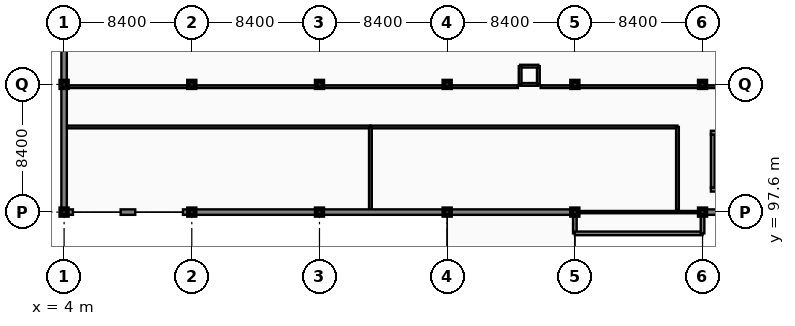
"""IFC4 building model, lengths in metres.
Left out: names, types, materials, properties, quantities, classifications, styles, units other than length and angle.
Written with IfcOpenShell. Run it as: python <this file> out.ifc"""

import sys

from ifc_helpers import new_model, si_unit, direction, frame, frame_2d, origin, origin_2d, place, context, subcontext, project, spatial, rectangle, extrude, element, fill, save


model = new_model("IFC4")
c1 = context("Model", 3, precision=1e-05, world=origin(), true_north=direction((0.0, 1.0)))
c2 = subcontext(c1, "Body", "Model", "MODEL_VIEW")
j1 = project(units=[si_unit("LENGTHUNIT", "METRE"), si_unit("PLANEANGLEUNIT", "RADIAN")], contexts=[c1])
p1 = place(None, origin())
s1 = spatial("IfcSite", under=j1, at=p1, CompositionType="ELEMENT")
p2 = place(p1, origin())
s2 = spatial("IfcBuilding", under=s1, at=p2, CompositionType="ELEMENT")
p3 = place(p2, frame((0.0, 0.0, 5.4)))
s3 = spatial("IfcBuildingStorey", under=s2, at=p3, CompositionType="ELEMENT", Elevation=5.4)
for number, where, z_axis, x_axis in (
    (1, (4.0, 97.6, 0.0), (0.0, 0.0, 1.0), (1.0, 0.0, 0.0)),
    (2, (4.0, 106.0, 0.0), (0.0, 0.0, 1.0), (1.0, 0.0, 0.0)),
    (3, (12.4, 97.6, 0.0), (0.0, 0.0, 1.0), (1.0, 0.0, 0.0)),
    (4, (12.4, 106.0, 0.0), (0.0, 0.0, 1.0), (1.0, 0.0, 0.0)),
    (5, (20.8, 97.6, 0.0), (0.0, 0.0, 1.0), (1.0, 0.0, 0.0)),
    (6, (20.8, 106.0, 0.0), (0.0, 0.0, 1.0), (1.0, 0.0, 0.0)),
    (7, (29.2, 97.6, 0.0), (0.0, 0.0, 1.0), (1.0, 0.0, 0.0)),
    (8, (29.2, 106.0, 0.0), (0.0, 0.0, 1.0), (1.0, 0.0, 0.0)),
    (9, (37.6, 97.6, 0.0), (0.0, 0.0, 1.0), (1.0, 0.0, 0.0)),
    (10, (37.6, 106.0, 0.0), (0.0, 0.0, 1.0), (1.0, 0.0, 0.0)),
    (11, (46.0, 97.6, 0.0), (0.0, 0.0, 1.0), (1.0, 0.0, 0.0)),
    (12, (46.0, 106.0, 0.0), (0.0, 0.0, 1.0), (1.0, 0.0, 0.0)),
):
    element("IfcColumn", number, at=place(p3, frame(where, z_axis=z_axis, x_axis=x_axis)), inside=s3, PredefinedType="COLUMN", context=c2, shape_type="SweptSolid", body=[
        extrude(rectangle(XDim=0.44, YDim=0.44, at=origin_2d()), origin(), (0.0, 0.0, 1.0), 4.2),
    ])
p4 = place(p3, frame((4.14, 103.2, 0.0), z_axis=(0.0, 0.0, 1.0), x_axis=(1.0, 0.0, 0.0)))
e13 = element("IfcWall", 13, at=p4, inside=s3, PredefinedType="PARTITIONING", context=c2, shape_type="SweptSolid", body=[
    extrude(rectangle(XDim=20.01, YDim=0.18, at=frame_2d((10.005, 0.0))), origin(), (0.0, 0.0, 1.0), 3.37),
])
p5 = place(p4, frame((9.505, 0.0, -0.01)))
e14 = element("IfcOpeningElement", 14, at=p5, cuts=e13, PredefinedType="OPENING", context=c2, shape_type="SweptSolid", body=[
    extrude(rectangle(XDim=1.0, YDim=2.16, at=frame_2d((0.5, 1.08))), frame((0.0, 0.1, 0.0), z_axis=(0.0, -1.0, 0.0), x_axis=(1.0, 0.0, 0.0)), (0.0, 0.0, 1.0), 0.2),
])
p6 = place(p3, frame((24.15, 103.2, 0.0), z_axis=(0.0, 0.0, 1.0), x_axis=(1.0, 0.0, 0.0)))
e15 = element("IfcWall", 15, at=p6, inside=s3, PredefinedType="PARTITIONING", context=c2, shape_type="SweptSolid", body=[
    extrude(rectangle(XDim=20.2, YDim=0.18, at=frame_2d((10.1, 0.0))), origin(), (0.0, 0.0, 1.0), 3.37),
])
p7 = place(p6, frame((9.6, 0.0, -0.01)))
e16 = element("IfcOpeningElement", 16, at=p7, cuts=e15, PredefinedType="OPENING", context=c2, shape_type="SweptSolid", body=[
    extrude(rectangle(XDim=1.0, YDim=2.16, at=frame_2d((0.5, 1.08))), frame((0.0, 0.1, 0.0), z_axis=(0.0, -1.0, 0.0), x_axis=(1.0, 0.0, 0.0)), (0.0, 0.0, 1.0), 0.2),
])
for number, where, z_axis, x_axis in (
    (17, (24.15, 97.74, 0.0), (0.0, 0.0, 1.0), (0.0, 1.0, 0.0)),
    (18, (44.35, 97.74, 0.0), (0.0, 0.0, 1.0), (0.0, 1.0, 0.0)),
):
    element("IfcWall", number, at=place(p3, frame(where, z_axis=z_axis, x_axis=x_axis)), inside=s3, PredefinedType="PARTITIONING", context=c2, shape_type="SweptSolid", body=[
        extrude(rectangle(XDim=5.46, YDim=0.18, at=frame_2d((2.73, 0.0))), origin(), (0.0, 0.0, 1.0), 3.52),
    ])
p8 = place(p3, frame((37.6, 97.6, 0.0), z_axis=(0.0, 0.0, 1.0), x_axis=(1.0, 0.0, 0.0)))
e19 = element("IfcWall", 19, at=p8, inside=s3, PredefinedType="PARTITIONING", context=c2, shape_type="SweptSolid", body=[
    extrude(rectangle(XDim=8.4, YDim=0.15, at=frame_2d((4.2, 0.0))), origin(), (0.0, 0.0, 1.0), 3.15),
])
p9 = place(p8, frame((2.59, 0.0, -0.01)))
e20 = element("IfcOpeningElement", 20, at=p9, cuts=e19, PredefinedType="OPENING", context=c2, shape_type="SweptSolid", body=[
    extrude(rectangle(XDim=1.0, YDim=2.16, at=frame_2d((0.5, 1.08))), frame((0.0, 0.085, 0.0), z_axis=(0.0, -1.0, 0.0), x_axis=(1.0, 0.0, 0.0)), (0.0, 0.0, 1.0), 0.17),
])
p10 = place(p3, frame((4.14, 105.85, 0.0), z_axis=(0.0, 0.0, 1.0), x_axis=(1.0, 0.0, 0.0)))
e21 = element("IfcWall", 21, at=p10, inside=s3, PredefinedType="PARTITIONING", context=c2, shape_type="SweptSolid", body=[
    extrude(rectangle(XDim=29.71, YDim=0.18, at=frame_2d((14.855, 0.0))), origin(), (0.0, 0.0, 1.0), 3.25),
])
p11 = place(p10, frame((12.649, 0.0, -0.01)))
e22 = element("IfcOpeningElement", 22, at=p11, cuts=e21, PredefinedType="OPENING", context=c2, shape_type="SweptSolid", body=[
    extrude(rectangle(XDim=1.6, YDim=2.21, at=frame_2d((0.8, 1.105))), frame((0.0, 0.1, 0.0), z_axis=(0.0, -1.0, 0.0), x_axis=(1.0, 0.0, 0.0)), (0.0, 0.0, 1.0), 0.2),
])
p12 = place(p3, frame((35.35, 105.85, 0.0), z_axis=(0.0, 0.0, 1.0), x_axis=(1.0, 0.0, 0.0)))
e23 = element("IfcWall", 23, at=p12, inside=s3, PredefinedType="PARTITIONING", context=c2, shape_type="SweptSolid", body=[
    extrude(rectangle(XDim=17.7, YDim=0.18, at=frame_2d((8.85, 0.0))), origin(), (0.0, 0.0, 1.0), 3.25),
])
p13 = place(p3, frame((7.72, 97.6, 0.0), z_axis=(0.0, 0.0, 1.0), x_axis=(1.0, 0.0, 0.0)))
e24 = element("IfcWall", 24, at=p13, inside=s3, PredefinedType="SOLIDWALL", context=c2, shape_type="SweptSolid", body=[
    extrude(rectangle(XDim=0.96, YDim=0.36, at=frame_2d((0.48, 0.0))), origin(), (0.0, 0.0, 1.0), 3.31),
])
p14 = place(p3, frame((4.13, 97.6, 0.0), z_axis=(0.0, 0.0, 1.0), x_axis=(1.0, 0.0, 0.0)))
e25 = element("IfcWall", 25, at=p14, inside=s3, PredefinedType="SOLIDWALL", context=c2, shape_type="SweptSolid", body=[
    extrude(rectangle(XDim=0.45, YDim=0.36, at=frame_2d((0.225, 0.0))), origin(), (0.0, 0.0, 1.0), 3.31),
])
p15 = place(p3, frame((11.82, 97.6, 0.0), z_axis=(0.0, 0.0, 1.0), x_axis=(1.0, 0.0, 0.0)))
e26 = element("IfcWall", 26, at=p15, inside=s3, PredefinedType="SOLIDWALL", context=c2, shape_type="SweptSolid", body=[
    extrude(rectangle(XDim=0.45, YDim=0.36, at=frame_2d((0.225, 0.0))), origin(), (0.0, 0.0, 1.0), 3.31),
])
p16 = place(p3, frame((12.4, 97.6, 0.0), z_axis=(0.0, 0.0, 1.0), x_axis=(1.0, 0.0, 0.0)))
e27 = element("IfcWall", 27, at=p16, inside=s3, PredefinedType="SOLIDWALL", context=c2, shape_type="SweptSolid", body=[
    extrude(rectangle(XDim=8.4, YDim=0.36, at=frame_2d((4.2, 0.0))), origin(), (0.0, 0.0, 1.0), 3.31),
])
p17 = place(p16, frame((0.46, 0.0, 0.75)))
e28 = element("IfcOpeningElement", 28, at=p17, cuts=e27, PredefinedType="OPENING", context=c2, shape_type="SweptSolid", body=[
    extrude(rectangle(XDim=1.55, YDim=2.42, at=frame_2d((0.775, 1.21))), frame((0.0, 0.19, 0.0), z_axis=(0.0, -1.0, 0.0), x_axis=(1.0, 0.0, 0.0)), (0.0, 0.0, 1.0), 0.38),
])
p18 = place(p16, frame((6.26, 0.0, 0.75)))
e29 = element("IfcOpeningElement", 29, at=p18, cuts=e27, PredefinedType="OPENING", context=c2, shape_type="SweptSolid", body=[
    extrude(rectangle(XDim=1.55, YDim=2.42, at=frame_2d((0.775, 1.21))), frame((0.0, 0.19, 0.0), z_axis=(0.0, -1.0, 0.0), x_axis=(1.0, 0.0, 0.0)), (0.0, 0.0, 1.0), 0.38),
])
p19 = place(p3, frame((20.8, 97.6, 0.0), z_axis=(0.0, 0.0, 1.0), x_axis=(1.0, 0.0, 0.0)))
e30 = element("IfcWall", 30, at=p19, inside=s3, PredefinedType="SOLIDWALL", context=c2, shape_type="SweptSolid", body=[
    extrude(rectangle(XDim=8.4, YDim=0.36, at=frame_2d((4.2, 0.0))), origin(), (0.0, 0.0, 1.0), 3.15),
])
p20 = place(p19, frame((0.46, 0.0, 0.75)))
e31 = element("IfcOpeningElement", 31, at=p20, cuts=e30, PredefinedType="OPENING", context=c2, shape_type="SweptSolid", body=[
    extrude(rectangle(XDim=1.55, YDim=2.26, at=frame_2d((0.775, 1.13))), frame((0.0, 0.19, 0.0), z_axis=(0.0, -1.0, 0.0), x_axis=(1.0, 0.0, 0.0)), (0.0, 0.0, 1.0), 0.38),
])
p21 = place(p19, frame((6.26, 0.0, 0.75)))
e32 = element("IfcOpeningElement", 32, at=p21, cuts=e30, PredefinedType="OPENING", context=c2, shape_type="SweptSolid", body=[
    extrude(rectangle(XDim=1.55, YDim=2.26, at=frame_2d((0.775, 1.13))), frame((0.0, 0.19, 0.0), z_axis=(0.0, -1.0, 0.0), x_axis=(1.0, 0.0, 0.0)), (0.0, 0.0, 1.0), 0.38),
])
p22 = place(p3, frame((29.2, 97.6, 0.0), z_axis=(0.0, 0.0, 1.0), x_axis=(1.0, 0.0, 0.0)))
e33 = element("IfcWall", 33, at=p22, inside=s3, PredefinedType="SOLIDWALL", context=c2, shape_type="SweptSolid", body=[
    extrude(rectangle(XDim=8.4, YDim=0.36, at=frame_2d((4.2, 0.0))), origin(), (0.0, 0.0, 1.0), 3.15),
])
p23 = place(p22, frame((3.6, 0.0, -0.01)))
e34 = element("IfcOpeningElement", 34, at=p23, cuts=e33, PredefinedType="OPENING", context=c2, shape_type="SweptSolid", body=[
    extrude(rectangle(XDim=1.2, YDim=2.21, at=frame_2d((0.6, 1.105))), frame((0.0, 0.19, 0.0), z_axis=(0.0, -1.0, 0.0), x_axis=(1.0, 0.0, 0.0)), (0.0, 0.0, 1.0), 0.38),
])
p24 = place(p3, frame((46.0, 97.6, 0.0), z_axis=(0.0, 0.0, 1.0), x_axis=(1.0, 0.0, 0.0)))
e35 = element("IfcWall", 35, at=p24, inside=s3, PredefinedType="SOLIDWALL", context=c2, shape_type="SweptSolid", body=[
    extrude(rectangle(XDim=4.8, YDim=0.36, at=frame_2d((2.4, 0.0))), origin(), (0.0, 0.0, 1.0), 3.37),
])
p25 = place(p24, frame((0.46, 0.0, 0.75)))
e36 = element("IfcOpeningElement", 36, at=p25, cuts=e35, PredefinedType="OPENING", context=c2, shape_type="SweptSolid", body=[
    extrude(rectangle(XDim=1.55, YDim=2.45, at=frame_2d((0.775, 1.225))), frame((0.0, 0.19, 0.0), z_axis=(0.0, -1.0, 0.0), x_axis=(1.0, 0.0, 0.0)), (0.0, 0.0, 1.0), 0.38),
])
p26 = place(p24, frame((2.66, 0.0, 0.75)))
e37 = element("IfcOpeningElement", 37, at=p26, cuts=e35, PredefinedType="OPENING", context=c2, shape_type="SweptSolid", body=[
    extrude(rectangle(XDim=1.55, YDim=2.45, at=frame_2d((0.775, 1.225))), frame((0.0, 0.19, 0.0), z_axis=(0.0, -1.0, 0.0), x_axis=(1.0, 0.0, 0.0)), (0.0, 0.0, 1.0), 0.38),
])
p27 = place(p3, frame((4.0, 106.0, 0.0), z_axis=(0.0, 0.0, 1.0), x_axis=(0.0, -1.0, 0.0)))
e38 = element("IfcWall", 38, at=p27, inside=s3, PredefinedType="SOLIDWALL", context=c2, shape_type="SweptSolid", body=[
    extrude(rectangle(XDim=8.4, YDim=0.36, at=frame_2d((4.2, 0.0))), origin(), (0.0, 0.0, 1.0), 3.31),
])
p28 = place(p27, frame((0.46, 0.0, 0.75)))
e39 = element("IfcOpeningElement", 39, at=p28, cuts=e38, PredefinedType="OPENING", context=c2, shape_type="SweptSolid", body=[
    extrude(rectangle(XDim=1.55, YDim=2.42, at=frame_2d((0.775, 1.21))), frame((0.0, 0.19, 0.0), z_axis=(0.0, -1.0, 0.0), x_axis=(1.0, 0.0, 0.0)), (0.0, 0.0, 1.0), 0.38),
])
p29 = place(p27, frame((6.26, 0.0, 0.75)))
e40 = element("IfcOpeningElement", 40, at=p29, cuts=e38, PredefinedType="OPENING", context=c2, shape_type="SweptSolid", body=[
    extrude(rectangle(XDim=1.55, YDim=2.42, at=frame_2d((0.775, 1.21))), frame((0.0, 0.19, 0.0), z_axis=(0.0, -1.0, 0.0), x_axis=(1.0, 0.0, 0.0)), (0.0, 0.0, 1.0), 0.38),
])
p30 = place(p3, frame((4.0, 115.0, 0.0), z_axis=(0.0, 0.0, 1.0), x_axis=(0.0, -1.0, 0.0)))
e41 = element("IfcWall", 41, at=p30, inside=s3, PredefinedType="SOLIDWALL", context=c2, shape_type="SweptSolid", body=[
    extrude(rectangle(XDim=9.0, YDim=0.36, at=frame_2d((4.5, 0.0))), origin(), (0.0, 0.0, 1.0), 3.31),
])
p31 = place(p30, frame((0.46, 0.0, 0.75)))
e42 = element("IfcOpeningElement", 42, at=p31, cuts=e41, PredefinedType="OPENING", context=c2, shape_type="SweptSolid", body=[
    extrude(rectangle(XDim=1.55, YDim=2.42, at=frame_2d((0.775, 1.21))), frame((0.0, 0.19, 0.0), z_axis=(0.0, -1.0, 0.0), x_axis=(1.0, 0.0, 0.0)), (0.0, 0.0, 1.0), 0.38),
])
p32 = place(p30, frame((6.86, 0.0, 0.75)))
e43 = element("IfcOpeningElement", 43, at=p32, cuts=e41, PredefinedType="OPENING", context=c2, shape_type="SweptSolid", body=[
    extrude(rectangle(XDim=1.55, YDim=2.42, at=frame_2d((0.775, 1.21))), frame((0.0, 0.19, 0.0), z_axis=(0.0, -1.0, 0.0), x_axis=(1.0, 0.0, 0.0)), (0.0, 0.0, 1.0), 0.38),
])
p33 = place(p3, frame((37.6, 97.45, 0.0), z_axis=(0.0, 0.0, 1.0), x_axis=(0.0, -1.0, 0.0)))
e44 = element("IfcWall", 44, at=p33, inside=s3, PredefinedType="SOLIDWALL", context=c2, shape_type="SweptSolid", body=[
    extrude(rectangle(XDim=1.25, YDim=0.24, at=frame_2d((0.625, 0.0))), origin(), (0.0, 0.0, 1.0), 3.15),
])
p34 = place(p3, frame((37.6, 96.2, 0.0), z_axis=(0.0, 0.0, 1.0), x_axis=(1.0, 0.0, 0.0)))
e45 = element("IfcWall", 45, at=p34, inside=s3, PredefinedType="SOLIDWALL", context=c2, shape_type="SweptSolid", body=[
    extrude(rectangle(XDim=8.4, YDim=0.24, at=frame_2d((4.2, 0.0))), origin(), (0.0, 0.0, 1.0), 3.15),
])
p35 = place(p34, frame((0.46, 0.0, 0.65)))
e46 = element("IfcOpeningElement", 46, at=p35, cuts=e45, PredefinedType="OPENING", context=c2, shape_type="SweptSolid", body=[
    extrude(rectangle(XDim=2.4, YDim=2.25, at=frame_2d((1.2, 1.125))), frame((0.0, 0.13, 0.0), z_axis=(0.0, -1.0, 0.0), x_axis=(1.0, 0.0, 0.0)), (0.0, 0.0, 1.0), 0.26),
])
p36 = place(p34, frame((5.46, 0.0, 0.65)))
e47 = element("IfcOpeningElement", 47, at=p36, cuts=e45, PredefinedType="OPENING", context=c2, shape_type="SweptSolid", body=[
    extrude(rectangle(XDim=2.4, YDim=2.25, at=frame_2d((1.2, 1.125))), frame((0.0, 0.13, 0.0), z_axis=(0.0, -1.0, 0.0), x_axis=(1.0, 0.0, 0.0)), (0.0, 0.0, 1.0), 0.26),
])
p37 = place(p3, frame((46.0, 96.2, 0.0), z_axis=(0.0, 0.0, 1.0), x_axis=(0.0, 1.0, 0.0)))
e48 = element("IfcWall", 48, at=p37, inside=s3, PredefinedType="SOLIDWALL", context=c2, shape_type="SweptSolid", body=[
    extrude(rectangle(XDim=1.25, YDim=0.24, at=frame_2d((0.625, 0.0))), origin(), (0.0, 0.0, 1.0), 3.15),
])
p38 = place(p3, frame((46.675, 102.7, 0.0), z_axis=(0.0, 0.0, 1.0), x_axis=(0.0, -1.0, 0.0)))
e49 = element("IfcWall", 49, at=p38, inside=s3, PredefinedType="SHEAR", context=c2, shape_type="SweptSolid", body=[
    extrude(rectangle(XDim=3.5, YDim=0.25, at=frame_2d((1.75, 0.0))), origin(), (0.0, 0.0, 1.0), 4.2),
])
p39 = place(p38, frame((1.1, 0.0, -0.01)))
e50 = element("IfcOpeningElement", 50, at=p39, cuts=e49, PredefinedType="OPENING", context=c2, shape_type="SweptSolid", body=[
    extrude(rectangle(XDim=1.3, YDim=2.16, at=frame_2d((0.65, 1.08))), frame((0.0, 0.135, 0.0), z_axis=(0.0, -1.0, 0.0), x_axis=(1.0, 0.0, 0.0)), (0.0, 0.0, 1.0), 0.27),
])
for number, where, z_axis, x_axis in (
    (51, (46.55, 99.075, 0.0), (0.0, 0.0, 1.0), (1.0, 0.0, 0.0)),
    (52, (46.55, 102.825, 0.0), (0.0, 0.0, 1.0), (1.0, 0.0, 0.0)),
):
    element("IfcWall", number, at=place(p3, frame(where, z_axis=z_axis, x_axis=x_axis)), inside=s3, PredefinedType="SHEAR", context=c2, shape_type="SweptSolid", body=[
        extrude(rectangle(XDim=8.9, YDim=0.25, at=frame_2d((4.45, 0.0))), origin(), (0.0, 0.0, 1.0), 4.2),
    ])
p40 = place(p3, frame((34.0, 106.0, 0.0), z_axis=(0.0, 0.0, 1.0), x_axis=(1.0, 0.0, 0.0)))
e53 = element("IfcWall", 53, at=p40, inside=s3, PredefinedType="SOLIDWALL", context=c2, shape_type="SweptSolid", body=[
    extrude(rectangle(XDim=1.2, YDim=0.18, at=frame_2d((0.6, 0.0))), origin(), (0.0, 0.0, 1.0), 3.97),
])
p41 = place(p40, frame((0.2, 0.0, -0.01)))
e54 = element("IfcOpeningElement", 54, at=p41, cuts=e53, PredefinedType="OPENING", context=c2, shape_type="SweptSolid", body=[
    extrude(rectangle(XDim=0.8, YDim=2.06, at=frame_2d((0.4, 1.03))), frame((0.0, 0.1, 0.0), z_axis=(0.0, -1.0, 0.0), x_axis=(1.0, 0.0, 0.0)), (0.0, 0.0, 1.0), 0.2),
])
for number, where, z_axis, x_axis in (
    (55, (35.2, 106.0, 0.0), (0.0, 0.0, 1.0), (0.0, 1.0, 0.0)),
    (56, (35.2, 107.2, 0.0), (0.0, 0.0, 1.0), (-1.0, 0.0, 0.0)),
    (57, (34.0, 107.2, 0.0), (0.0, 0.0, 1.0), (0.0, -1.0, 0.0)),
):
    element("IfcWall", number, at=place(p3, frame(where, z_axis=z_axis, x_axis=x_axis)), inside=s3, PredefinedType="SOLIDWALL", context=c2, shape_type="SweptSolid", body=[
        extrude(rectangle(XDim=1.2, YDim=0.18, at=frame_2d((0.6, 0.0))), origin(), (0.0, 0.0, 1.0), 3.97),
    ])
p42 = place(p5, frame((0.0, 0.0, 0.01)))
e58 = element("IfcDoor", 58, at=p42, inside=s3, OperationType="SINGLE_SWING_LEFT", PredefinedType="DOOR", context=c2, shape_type="SweptSolid", body=[
    extrude(rectangle(XDim=1.0, YDim=2.15, at=frame_2d((0.5, 1.075))), frame((0.0, 0.025, 0.0), z_axis=(0.0, -1.0, 0.0), x_axis=(1.0, 0.0, 0.0)), (0.0, 0.0, 1.0), 0.05),
])
fill(e14, e58)
p43 = place(p7, frame((1.0, 0.0, 0.01), z_axis=(0.0, 0.0, 1.0), x_axis=(-1.0, 0.0, 0.0)))
e59 = element("IfcDoor", 59, at=p43, inside=s3, OperationType="SINGLE_SWING_RIGHT", PredefinedType="DOOR", context=c2, shape_type="SweptSolid", body=[
    extrude(rectangle(XDim=1.0, YDim=2.15, at=frame_2d((0.5, 1.075))), frame((0.0, 0.025, 0.0), z_axis=(0.0, -1.0, 0.0), x_axis=(1.0, 0.0, 0.0)), (0.0, 0.0, 1.0), 0.05),
])
fill(e16, e59)
p44 = place(p9, frame((0.0, 0.0, 0.01)))
e60 = element("IfcDoor", 60, at=p44, inside=s3, OperationType="SINGLE_SWING_RIGHT", PredefinedType="DOOR", context=c2, shape_type="SweptSolid", body=[
    extrude(rectangle(XDim=1.0, YDim=2.15, at=frame_2d((0.5, 1.075))), frame((0.0, 0.025, 0.0), z_axis=(0.0, -1.0, 0.0), x_axis=(1.0, 0.0, 0.0)), (0.0, 0.0, 1.0), 0.05),
])
fill(e20, e60)
p45 = place(p11, frame((0.0, 0.0, 0.01)))
e61 = element("IfcDoor", 61, at=p45, inside=s3, OperationType="DOUBLE_SWING_LEFT", PredefinedType="DOOR", context=c2, shape_type="SweptSolid", body=[
    extrude(rectangle(XDim=1.6, YDim=2.2, at=frame_2d((0.8, 1.1))), frame((0.0, 0.025, 0.0), z_axis=(0.0, -1.0, 0.0), x_axis=(1.0, 0.0, 0.0)), (0.0, 0.0, 1.0), 0.05),
])
fill(e22, e61)
p46 = place(p17, origin())
e62 = element("IfcWindow", 62, at=p46, inside=s3, PartitioningType="DOUBLE_PANEL_HORIZONTAL", PredefinedType="WINDOW", context=c2, shape_type="SweptSolid", body=[
    extrude(rectangle(XDim=1.55, YDim=2.42, at=frame_2d((0.775, 1.21))), frame((0.0, 0.03, 0.0), z_axis=(0.0, -1.0, 0.0), x_axis=(1.0, 0.0, 0.0)), (0.0, 0.0, 1.0), 0.06),
])
fill(e28, e62)
p47 = place(p18, origin())
e63 = element("IfcWindow", 63, at=p47, inside=s3, PartitioningType="DOUBLE_PANEL_HORIZONTAL", PredefinedType="WINDOW", context=c2, shape_type="SweptSolid", body=[
    extrude(rectangle(XDim=1.55, YDim=2.42, at=frame_2d((0.775, 1.21))), frame((0.0, 0.03, 0.0), z_axis=(0.0, -1.0, 0.0), x_axis=(1.0, 0.0, 0.0)), (0.0, 0.0, 1.0), 0.06),
])
fill(e29, e63)
p48 = place(p20, origin())
e64 = element("IfcWindow", 64, at=p48, inside=s3, PartitioningType="DOUBLE_PANEL_HORIZONTAL", PredefinedType="WINDOW", context=c2, shape_type="SweptSolid", body=[
    extrude(rectangle(XDim=1.55, YDim=2.26, at=frame_2d((0.775, 1.13))), frame((0.0, 0.03, 0.0), z_axis=(0.0, -1.0, 0.0), x_axis=(1.0, 0.0, 0.0)), (0.0, 0.0, 1.0), 0.06),
])
fill(e31, e64)
p49 = place(p21, origin())
e65 = element("IfcWindow", 65, at=p49, inside=s3, PartitioningType="DOUBLE_PANEL_HORIZONTAL", PredefinedType="WINDOW", context=c2, shape_type="SweptSolid", body=[
    extrude(rectangle(XDim=1.55, YDim=2.26, at=frame_2d((0.775, 1.13))), frame((0.0, 0.03, 0.0), z_axis=(0.0, -1.0, 0.0), x_axis=(1.0, 0.0, 0.0)), (0.0, 0.0, 1.0), 0.06),
])
fill(e32, e65)
p50 = place(p23, frame((0.0, 0.0, 0.01)))
e66 = element("IfcDoor", 66, at=p50, inside=s3, OperationType="SINGLE_SWING_RIGHT", PredefinedType="DOOR", context=c2, shape_type="SweptSolid", body=[
    extrude(rectangle(XDim=1.2, YDim=2.2, at=frame_2d((0.6, 1.1))), frame((0.0, 0.025, 0.0), z_axis=(0.0, -1.0, 0.0), x_axis=(1.0, 0.0, 0.0)), (0.0, 0.0, 1.0), 0.05),
])
fill(e34, e66)
p51 = place(p25, origin())
e67 = element("IfcWindow", 67, at=p51, inside=s3, PartitioningType="DOUBLE_PANEL_HORIZONTAL", PredefinedType="WINDOW", context=c2, shape_type="SweptSolid", body=[
    extrude(rectangle(XDim=1.55, YDim=2.45, at=frame_2d((0.775, 1.225))), frame((0.0, 0.03, 0.0), z_axis=(0.0, -1.0, 0.0), x_axis=(1.0, 0.0, 0.0)), (0.0, 0.0, 1.0), 0.06),
])
fill(e36, e67)
p52 = place(p28, origin())
e68 = element("IfcWindow", 68, at=p52, inside=s3, PartitioningType="DOUBLE_PANEL_HORIZONTAL", PredefinedType="WINDOW", context=c2, shape_type="SweptSolid", body=[
    extrude(rectangle(XDim=1.55, YDim=2.42, at=frame_2d((0.775, 1.21))), frame((0.0, 0.03, 0.0), z_axis=(0.0, -1.0, 0.0), x_axis=(1.0, 0.0, 0.0)), (0.0, 0.0, 1.0), 0.06),
])
fill(e39, e68)
p53 = place(p29, origin())
e69 = element("IfcWindow", 69, at=p53, inside=s3, PartitioningType="DOUBLE_PANEL_HORIZONTAL", PredefinedType="WINDOW", context=c2, shape_type="SweptSolid", body=[
    extrude(rectangle(XDim=1.55, YDim=2.42, at=frame_2d((0.775, 1.21))), frame((0.0, 0.03, 0.0), z_axis=(0.0, -1.0, 0.0), x_axis=(1.0, 0.0, 0.0)), (0.0, 0.0, 1.0), 0.06),
])
fill(e40, e69)
p54 = place(p32, origin())
e70 = element("IfcWindow", 70, at=p54, inside=s3, PartitioningType="DOUBLE_PANEL_HORIZONTAL", PredefinedType="WINDOW", context=c2, shape_type="SweptSolid", body=[
    extrude(rectangle(XDim=1.55, YDim=2.42, at=frame_2d((0.775, 1.21))), frame((0.0, 0.03, 0.0), z_axis=(0.0, -1.0, 0.0), x_axis=(1.0, 0.0, 0.0)), (0.0, 0.0, 1.0), 0.06),
])
fill(e43, e70)
p55 = place(p35, origin())
e71 = element("IfcWindow", 71, at=p55, inside=s3, PartitioningType="TRIPLE_PANEL_VERTICAL", PredefinedType="WINDOW", context=c2, shape_type="SweptSolid", body=[
    extrude(rectangle(XDim=2.4, YDim=2.25, at=frame_2d((1.2, 1.125))), frame((0.0, 0.03, 0.0), z_axis=(0.0, -1.0, 0.0), x_axis=(1.0, 0.0, 0.0)), (0.0, 0.0, 1.0), 0.06),
])
fill(e46, e71)
p56 = place(p36, origin())
e72 = element("IfcWindow", 72, at=p56, inside=s3, PartitioningType="TRIPLE_PANEL_VERTICAL", PredefinedType="WINDOW", context=c2, shape_type="SweptSolid", body=[
    extrude(rectangle(XDim=2.4, YDim=2.25, at=frame_2d((1.2, 1.125))), frame((0.0, 0.03, 0.0), z_axis=(0.0, -1.0, 0.0), x_axis=(1.0, 0.0, 0.0)), (0.0, 0.0, 1.0), 0.06),
])
fill(e47, e72)
p57 = place(p39, frame((0.0, 0.0, 0.01)))
e73 = element("IfcDoor", 73, at=p57, inside=s3, OperationType="SINGLE_SWING_RIGHT", PredefinedType="DOOR", context=c2, shape_type="SweptSolid", body=[
    extrude(rectangle(XDim=1.3, YDim=2.15, at=frame_2d((0.65, 1.075))), frame((0.0, 0.025, 0.0), z_axis=(0.0, -1.0, 0.0), x_axis=(1.0, 0.0, 0.0)), (0.0, 0.0, 1.0), 0.05),
])
fill(e50, e73)
p58 = place(p41, frame((0.0, 0.0, 0.01)))
e74 = element("IfcDoor", 74, at=p58, inside=s3, OperationType="SINGLE_SWING_LEFT", PredefinedType="DOOR", context=c2, shape_type="SweptSolid", body=[
    extrude(rectangle(XDim=0.8, YDim=2.05, at=frame_2d((0.4, 1.025))), frame((0.0, 0.025, 0.0), z_axis=(0.0, -1.0, 0.0), x_axis=(1.0, 0.0, 0.0)), (0.0, 0.0, 1.0), 0.05),
])
fill(e54, e74)
save(model, sys.argv[1])
